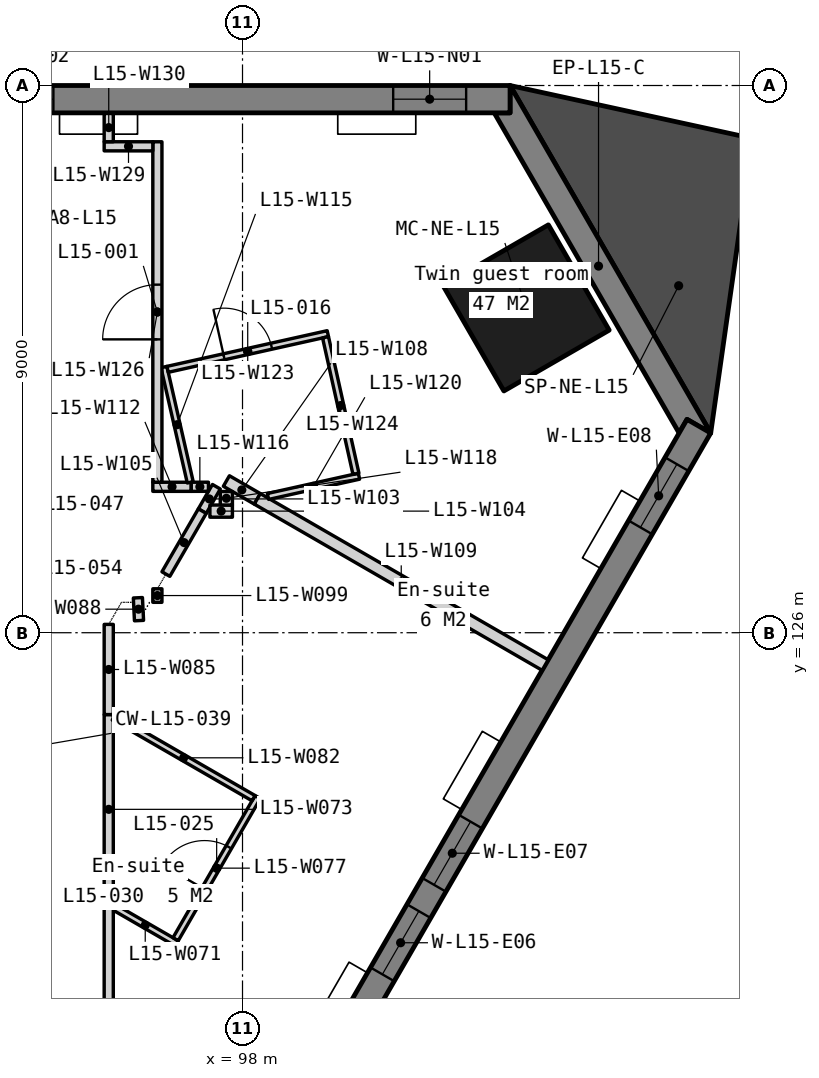
"""IFC4 building model, lengths in metres.
Left out: names, types, materials, properties, quantities, classifications, styles, units other than length and angle.
Written with IfcOpenShell. Run it as: python <this file> out.ifc"""

import sys

from ifc_helpers import new_model, si_unit, direction, frame, frame_2d, origin, origin_2d, place, context, subcontext, project, spatial, polyline, rectangle, outline, extrude, element, fill, save


model = new_model("IFC4")
c1 = context("Model", 3, precision=1e-05, world=origin(), true_north=direction((0.0, 1.0)))
c2 = subcontext(c1, "Body", "Model", "MODEL_VIEW")
j1 = project(units=[si_unit("LENGTHUNIT", "METRE"), si_unit("PLANEANGLEUNIT", "RADIAN")], contexts=[c1])
p1 = place(None, origin())
s1 = spatial("IfcSite", under=j1, at=p1, CompositionType="ELEMENT")
p2 = place(p1, origin())
s2 = spatial("IfcBuilding", under=s1, at=p2, CompositionType="ELEMENT")
p3 = place(p2, frame((0.0, 0.0, 66.5)))
s3 = spatial("IfcBuildingStorey", under=s2, at=p3, CompositionType="ELEMENT", Elevation=66.5)
p4 = place(p3, frame((102.664, 131.342, 0.0), z_axis=(0.0, 0.0, 1.0), x_axis=(-0.5, 0.866025403784, 0.0)))
e1 = element("IfcColumn", 1, at=p4, inside=s3, PredefinedType="COLUMN", context=c2, shape_type="SweptSolid", body=[
    extrude(rectangle(XDim=2.0, YDim=2.0, at=origin_2d()), origin(), (0.0, 0.0, 1.0), 3.5),
])
p5 = place(p3, frame((0.0, 0.0, -0.15)))
e2 = element("IfcWall", 2, at=p5, inside=s3, PredefinedType="SOLIDWALL", context=c2, shape_type="SweptSolid", body=[
    extrude(outline(polyline([(105.7, 129.284), (105.31, 129.509), (105.18, 129.284), (102.14, 134.55), (102.4, 134.55), (102.4, 135.0), (105.7, 129.284)])), origin(), (0.0, 0.0, 1.0), 3.5),
])
p6 = place(p3, frame((102.4, 134.775, -0.15), z_axis=(0.0, 0.0, 1.0), x_axis=(-1.0, 0.0, 0.0)))
e3 = element("IfcWall", 3, at=p6, inside=s3, PredefinedType="SOLIDWALL", context=c2, shape_type="SweptSolid", body=[
    extrude(outline(polyline([(44.8, 0.0), (44.8, 3.5), (0.0, 3.5), (0.0, 0.0), (44.8, 0.0)])), frame((0.0, 0.225, 0.0), z_axis=(0.0, -1.0, 0.0), x_axis=(1.0, 0.0, 0.0)), (0.0, 0.0, 1.0), 0.45),
])
p7 = place(p6, frame((0.722, 0.0, 1.05)))
e4 = element("IfcOpeningElement", 4, at=p7, cuts=e3, PredefinedType="OPENING", context=c2, shape_type="SweptSolid", body=[
    extrude(rectangle(XDim=1.2, YDim=1.5, at=frame_2d((0.6, 0.75))), frame((0.0, 0.235, 0.0), z_axis=(0.0, -1.0, 0.0), x_axis=(1.0, 0.0, 0.0)), (0.0, 0.0, 1.0), 0.47),
])
p8 = place(p6, frame((7.51, 0.0, 1.05)))
e5 = element("IfcOpeningElement", 5, at=p8, cuts=e3, PredefinedType="OPENING", context=c2, shape_type="SweptSolid", body=[
    extrude(rectangle(XDim=1.2, YDim=1.5, at=frame_2d((0.6, 0.75))), frame((0.0, 0.235, 0.0), z_axis=(0.0, -1.0, 0.0), x_axis=(1.0, 0.0, 0.0)), (0.0, 0.0, 1.0), 0.47),
])
p9 = place(p6, frame((9.21, 0.0, 1.05)))
e6 = element("IfcOpeningElement", 6, at=p9, cuts=e3, PredefinedType="OPENING", context=c2, shape_type="SweptSolid", body=[
    extrude(rectangle(XDim=1.2, YDim=1.5, at=frame_2d((0.6, 0.75))), frame((0.0, 0.235, 0.0), z_axis=(0.0, -1.0, 0.0), x_axis=(1.0, 0.0, 0.0)), (0.0, 0.0, 1.0), 0.47),
])
p10 = place(p6, frame((16.47, 0.0, 1.05)))
e7 = element("IfcOpeningElement", 7, at=p10, cuts=e3, PredefinedType="OPENING", context=c2, shape_type="SweptSolid", body=[
    extrude(rectangle(XDim=1.2, YDim=1.5, at=frame_2d((0.6, 0.75))), frame((0.0, 0.235, 0.0), z_axis=(0.0, -1.0, 0.0), x_axis=(1.0, 0.0, 0.0)), (0.0, 0.0, 1.0), 0.47),
])
p11 = place(p6, frame((18.17, 0.0, 1.05)))
e8 = element("IfcOpeningElement", 8, at=p11, cuts=e3, PredefinedType="OPENING", context=c2, shape_type="SweptSolid", body=[
    extrude(rectangle(XDim=1.2, YDim=1.5, at=frame_2d((0.6, 0.75))), frame((0.0, 0.235, 0.0), z_axis=(0.0, -1.0, 0.0), x_axis=(1.0, 0.0, 0.0)), (0.0, 0.0, 1.0), 0.47),
])
p12 = place(p6, frame((25.43, 0.0, 1.05)))
e9 = element("IfcOpeningElement", 9, at=p12, cuts=e3, PredefinedType="OPENING", context=c2, shape_type="SweptSolid", body=[
    extrude(rectangle(XDim=1.2, YDim=1.5, at=frame_2d((0.6, 0.75))), frame((0.0, 0.235, 0.0), z_axis=(0.0, -1.0, 0.0), x_axis=(1.0, 0.0, 0.0)), (0.0, 0.0, 1.0), 0.47),
])
p13 = place(p6, frame((27.13, 0.0, 1.05)))
e10 = element("IfcOpeningElement", 10, at=p13, cuts=e3, PredefinedType="OPENING", context=c2, shape_type="SweptSolid", body=[
    extrude(rectangle(XDim=1.2, YDim=1.5, at=frame_2d((0.6, 0.75))), frame((0.0, 0.235, 0.0), z_axis=(0.0, -1.0, 0.0), x_axis=(1.0, 0.0, 0.0)), (0.0, 0.0, 1.0), 0.47),
])
p14 = place(p6, frame((34.39, 0.0, 1.05)))
e11 = element("IfcOpeningElement", 11, at=p14, cuts=e3, PredefinedType="OPENING", context=c2, shape_type="SweptSolid", body=[
    extrude(rectangle(XDim=1.2, YDim=1.5, at=frame_2d((0.6, 0.75))), frame((0.0, 0.235, 0.0), z_axis=(0.0, -1.0, 0.0), x_axis=(1.0, 0.0, 0.0)), (0.0, 0.0, 1.0), 0.47),
])
p15 = place(p6, frame((36.09, 0.0, 1.05)))
e12 = element("IfcOpeningElement", 12, at=p15, cuts=e3, PredefinedType="OPENING", context=c2, shape_type="SweptSolid", body=[
    extrude(rectangle(XDim=1.2, YDim=1.5, at=frame_2d((0.6, 0.75))), frame((0.0, 0.235, 0.0), z_axis=(0.0, -1.0, 0.0), x_axis=(1.0, 0.0, 0.0)), (0.0, 0.0, 1.0), 0.47),
])
p16 = place(p6, frame((42.878, 0.0, 1.05)))
e13 = element("IfcOpeningElement", 13, at=p16, cuts=e3, PredefinedType="OPENING", context=c2, shape_type="SweptSolid", body=[
    extrude(rectangle(XDim=1.2, YDim=1.5, at=frame_2d((0.6, 0.75))), frame((0.0, 0.235, 0.0), z_axis=(0.0, -1.0, 0.0), x_axis=(1.0, 0.0, 0.0)), (0.0, 0.0, 1.0), 0.47),
])
p17 = place(p3, frame((88.435, 99.831, -0.15), z_axis=(0.0, 0.0, 1.0), x_axis=(0.500000806382, 0.866024938219, 0.0)))
e14 = element("IfcWall", 14, at=p17, inside=s3, PredefinedType="SOLIDWALL", context=c2, shape_type="SweptSolid", body=[
    extrude(outline(polyline([(34.14, 3.5), (34.14, 0.0), (0.0, 0.0), (0.0, 3.5), (34.14, 3.5)])), frame((0.0, 0.225, 0.0), z_axis=(0.0, -1.0, 0.0), x_axis=(1.0, 0.0, 0.0)), (0.0, 0.0, 1.0), 0.45),
])
p18 = place(p17, frame((5.81, 0.0, 1.05)))
e15 = element("IfcOpeningElement", 15, at=p18, cuts=e14, PredefinedType="OPENING", context=c2, shape_type="SweptSolid", body=[
    extrude(rectangle(XDim=1.2, YDim=1.5, at=frame_2d((0.6, 0.75))), frame((0.0, 0.235, 0.0), z_axis=(0.0, -1.0, 0.0), x_axis=(1.0, 0.0, 0.0)), (0.0, 0.0, 1.0), 0.47),
])
p19 = place(p17, frame((7.51, 0.0, 1.05)))
e16 = element("IfcOpeningElement", 16, at=p19, cuts=e14, PredefinedType="OPENING", context=c2, shape_type="SweptSolid", body=[
    extrude(rectangle(XDim=1.2, YDim=1.5, at=frame_2d((0.6, 0.75))), frame((0.0, 0.235, 0.0), z_axis=(0.0, -1.0, 0.0), x_axis=(1.0, 0.0, 0.0)), (0.0, 0.0, 1.0), 0.47),
])
p20 = place(p17, frame((14.77, 0.0, 1.05)))
e17 = element("IfcOpeningElement", 17, at=p20, cuts=e14, PredefinedType="OPENING", context=c2, shape_type="SweptSolid", body=[
    extrude(rectangle(XDim=1.2, YDim=1.5, at=frame_2d((0.6, 0.75))), frame((0.0, 0.235, 0.0), z_axis=(0.0, -1.0, 0.0), x_axis=(1.0, 0.0, 0.0)), (0.0, 0.0, 1.0), 0.47),
])
p21 = place(p17, frame((16.47, 0.0, 1.05)))
e18 = element("IfcOpeningElement", 18, at=p21, cuts=e14, PredefinedType="OPENING", context=c2, shape_type="SweptSolid", body=[
    extrude(rectangle(XDim=1.2, YDim=1.5, at=frame_2d((0.6, 0.75))), frame((0.0, 0.235, 0.0), z_axis=(0.0, -1.0, 0.0), x_axis=(1.0, 0.0, 0.0)), (0.0, 0.0, 1.0), 0.47),
])
p22 = place(p17, frame((23.73, 0.0, 1.05)))
e19 = element("IfcOpeningElement", 19, at=p22, cuts=e14, PredefinedType="OPENING", context=c2, shape_type="SweptSolid", body=[
    extrude(rectangle(XDim=1.2, YDim=1.5, at=frame_2d((0.6, 0.75))), frame((0.0, 0.235, 0.0), z_axis=(0.0, -1.0, 0.0), x_axis=(1.0, 0.0, 0.0)), (0.0, 0.0, 1.0), 0.47),
])
p23 = place(p17, frame((25.43, 0.0, 1.05)))
e20 = element("IfcOpeningElement", 20, at=p23, cuts=e14, PredefinedType="OPENING", context=c2, shape_type="SweptSolid", body=[
    extrude(rectangle(XDim=1.2, YDim=1.5, at=frame_2d((0.6, 0.75))), frame((0.0, 0.235, 0.0), z_axis=(0.0, -1.0, 0.0), x_axis=(1.0, 0.0, 0.0)), (0.0, 0.0, 1.0), 0.47),
])
p24 = place(p17, frame((32.218, 0.0, 1.05)))
e21 = element("IfcOpeningElement", 21, at=p24, cuts=e14, PredefinedType="OPENING", context=c2, shape_type="SweptSolid", body=[
    extrude(rectangle(XDim=1.2, YDim=1.5, at=frame_2d((0.6, 0.75))), frame((0.0, 0.235, 0.0), z_axis=(0.0, -1.0, 0.0), x_axis=(1.0, 0.0, 0.0)), (0.0, 0.0, 1.0), 0.47),
])
p25 = place(p3, frame((0.0, 0.0, -0.15)))
e22 = element("IfcWall", 22, at=p25, inside=s3, PredefinedType="SOLIDWALL", context=c2, shape_type="SweptSolid", body=[
    extrude(outline(polyline([(105.7, 129.284), (106.389, 134.13), (102.4, 135.0), (105.7, 129.284)])), origin(), (0.0, 0.0, 1.0), 3.5),
])
p26 = place(p3, frame((95.882, 121.489, 0.0), z_axis=(0.0, 0.0, 1.0), x_axis=(0.865998640954, -0.500046351717, 0.0)))
e23 = element("IfcWall", 23, at=p26, inside=s3, PredefinedType="PARTITIONING", context=c2, shape_type="SweptSolid", body=[
    extrude(rectangle(XDim=1.196, YDim=0.1, at=frame_2d((0.598, 0.0))), origin(), (0.0, 0.0, 1.0), 3.35),
])
p27 = place(p3, frame((95.8, 121.536, 0.0), z_axis=(0.0, 0.0, 1.0), x_axis=(0.0, 1.0, 0.0)))
e24 = element("IfcWall", 24, at=p27, inside=s3, PredefinedType="PARTITIONING", context=c2, shape_type="SweptSolid", body=[
    extrude(rectangle(XDim=3.118, YDim=0.15, at=frame_2d((1.559, 0.0))), origin(), (0.0, 0.0, 1.0), 3.35),
])
p28 = place(p3, frame((95.8, 117.825, 0.0), z_axis=(0.0, 0.0, 1.0), x_axis=(0.0, 1.0, 0.0)))
e25 = element("IfcWall", 25, at=p28, inside=s3, PredefinedType="PARTITIONING", context=c2, shape_type="SweptSolid", body=[
    extrude(rectangle(XDim=3.711, YDim=0.15, at=frame_2d((1.855, 0.0))), origin(), (0.0, 0.0, 1.0), 3.35),
])
p29 = place(p3, frame((96.9, 120.959, 0.0), z_axis=(0.0, 0.0, 1.0), x_axis=(0.499980770555, 0.866036505625, 0.0)))
e26 = element("IfcWall", 26, at=p29, inside=s3, PredefinedType="PARTITIONING", context=c2, shape_type="SweptSolid", body=[
    extrude(rectangle(XDim=2.7, YDim=0.1, at=frame_2d((1.35, 0.0))), origin(), (0.0, 0.0, 1.0), 3.35),
])
p30 = place(p29, frame((0.95, 0.0, 0.0)))
e27 = element("IfcOpeningElement", 27, at=p30, cuts=e26, PredefinedType="OPENING", context=c2, shape_type="SweptSolid", body=[
    extrude(rectangle(XDim=0.8, YDim=2.1, at=frame_2d((0.4, 1.05))), frame((0.0, 0.06, 0.0), z_axis=(0.0, -1.0, 0.0), x_axis=(1.0, 0.0, 0.0)), (0.0, 0.0, 1.0), 0.12),
])
p31 = place(p3, frame((95.882, 124.606, 0.0), z_axis=(0.0, 0.0, 1.0), x_axis=(0.866004891035, -0.500035527442, 0.0)))
e28 = element("IfcWall", 28, at=p31, inside=s3, PredefinedType="PARTITIONING", context=c2, shape_type="SweptSolid", body=[
    extrude(rectangle(XDim=2.655, YDim=0.1, at=frame_2d((1.328, 0.0))), origin(), (0.0, 0.0, 1.0), 3.35),
])
p32 = place(p3, frame((95.8, 124.654, 0.0), z_axis=(0.0, 0.0, 1.0), x_axis=(0.0, 1.0, 0.0)))
e29 = element("IfcWall", 29, at=p32, inside=s3, PredefinedType="PARTITIONING", context=c2, shape_type="SweptSolid", body=[
    extrude(rectangle(XDim=1.483, YDim=0.15, at=frame_2d((0.742, 0.0))), origin(), (0.0, 0.0, 1.0), 3.35),
])
p33 = place(p3, frame((96.28, 126.575, 0.0), z_axis=(0.0, 0.0, 1.0), x_axis=(0.049354603538, -0.998781318963, 0.0)))
e30 = element("IfcWall", 30, at=p33, inside=s3, PredefinedType="PARTITIONING", context=c2, shape_type="SweptSolid", body=[
    extrude(rectangle(XDim=0.376, YDim=0.15, at=frame_2d((0.188, 0.0))), origin(), (0.0, 0.0, 1.0), 3.35),
])
p34 = place(p3, frame((96.6, 126.5, 0.0), z_axis=(0.0, 0.0, 1.0), x_axis=(0.0, 1.0, 0.0)))
e31 = element("IfcWall", 31, at=p34, inside=s3, PredefinedType="PARTITIONING", context=c2, shape_type="SweptSolid", body=[
    extrude(rectangle(XDim=0.223, YDim=0.15, at=frame_2d((0.111, 0.0))), origin(), (0.0, 0.0, 1.0), 3.35),
])
p35 = place(p3, frame((97.339, 128.0, 0.0), z_axis=(0.0, 0.0, 1.0), x_axis=(0.500391795928, 0.865799082101, 0.0)))
e32 = element("IfcWall", 32, at=p35, inside=s3, PredefinedType="PARTITIONING", context=c2, shape_type="SweptSolid", body=[
    extrude(rectangle(XDim=0.463, YDim=0.15, at=frame_2d((0.231, 0.0))), origin(), (0.0, 0.0, 1.0), 3.35),
])
p36 = place(p3, frame((97.464, 128.0, 0.0), z_axis=(0.0, 0.0, 1.0), x_axis=(1.0, 0.0, 0.0)))
e33 = element("IfcWall", 33, at=p36, inside=s3, PredefinedType="PARTITIONING", context=c2, shape_type="SweptSolid", body=[
    extrude(rectangle(XDim=0.37, YDim=0.2, at=frame_2d((0.185, 0.0))), origin(), (0.0, 0.0, 1.0), 2.938),
])
p37 = place(p3, frame((96.74, 126.965, 0.0), z_axis=(0.0, 0.0, 1.0), x_axis=(0.500529245116, 0.865719628277, 0.0)))
e34 = element("IfcWall", 34, at=p37, inside=s3, PredefinedType="PARTITIONING", context=c2, shape_type="SweptSolid", body=[
    extrude(rectangle(XDim=1.196, YDim=0.15, at=frame_2d((0.598, 0.0))), origin(), (0.0, 0.0, 1.0), 3.35),
])
p38 = place(p3, frame((97.735, 128.495, 0.0), z_axis=(0.0, 0.0, 1.0), x_axis=(0.866137124377, -0.499806444312, 0.0)))
e35 = element("IfcWall", 35, at=p38, inside=s3, PredefinedType="PARTITIONING", context=c2, shape_type="SweptSolid", body=[
    extrude(rectangle(XDim=0.587, YDim=0.2, at=frame_2d((0.293, 0.0))), origin(), (0.0, 0.0, 1.0), 3.35),
])
p39 = place(p3, frame((98.243, 128.202, 0.0), z_axis=(0.0, 0.0, 1.0), x_axis=(0.866021955858, -0.500005971936, 0.0)))
e36 = element("IfcWall", 36, at=p39, inside=s3, PredefinedType="PARTITIONING", context=c2, shape_type="SweptSolid", body=[
    extrude(rectangle(XDim=5.466, YDim=0.2, at=frame_2d((2.733, 0.0))), origin(), (0.0, 0.0, 1.0), 3.35),
])
p40 = place(p3, frame((96.525, 128.4, 0.0), z_axis=(0.0, 0.0, 1.0), x_axis=(1.0, 0.0, 0.0)))
e37 = element("IfcWall", 37, at=p40, inside=s3, PredefinedType="PARTITIONING", context=c2, shape_type="SweptSolid", body=[
    extrude(rectangle(XDim=0.633, YDim=0.15, at=frame_2d((0.316, 0.0))), origin(), (0.0, 0.0, 1.0), 3.35),
])
p41 = place(p3, frame((96.708, 130.37, 0.0), z_axis=(0.0, 0.0, 1.0), x_axis=(0.222402197424, -0.974955005413, 0.0)))
e38 = element("IfcWall", 38, at=p41, inside=s3, PredefinedType="PARTITIONING", context=c2, shape_type="SweptSolid", body=[
    extrude(rectangle(XDim=1.945, YDim=0.1, at=frame_2d((0.973, 0.0))), origin(), (0.0, 0.0, 1.0), 3.35),
])
p42 = place(p3, frame((97.157, 128.4, 0.0), z_axis=(0.0, 0.0, 1.0), x_axis=(0.999996638419, 0.002592903989, 0.0)))
e39 = element("IfcWall", 39, at=p42, inside=s3, PredefinedType="PARTITIONING", context=c2, shape_type="SweptSolid", body=[
    extrude(rectangle(XDim=0.282, YDim=0.15, at=frame_2d((0.141, 0.0))), origin(), (0.0, 0.0, 1.0), 3.35),
])
p43 = place(p3, frame((97.734, 128.1, 0.0), z_axis=(0.0, 0.0, 1.0), x_axis=(0.001098900435, 0.999999396209, 0.0)))
e40 = element("IfcWall", 40, at=p43, inside=s3, PredefinedType="PARTITIONING", context=c2, shape_type="SweptSolid", body=[
    extrude(rectangle(XDim=0.222, YDim=0.2, at=frame_2d((0.111, 0.0))), origin(), (0.0, 0.0, 1.0), 3.35),
])
p44 = place(p3, frame((98.419, 128.241, 0.0), z_axis=(0.0, 0.0, 1.0), x_axis=(0.976051976124, 0.217537444834, 0.0)))
e41 = element("IfcWall", 41, at=p44, inside=s3, PredefinedType="PARTITIONING", context=c2, shape_type="SweptSolid", body=[
    extrude(rectangle(XDim=1.533, YDim=0.1, at=frame_2d((0.767, 0.0))), origin(), (0.0, 0.0, 1.0), 3.35),
])
p45 = place(p3, frame((96.768, 130.332, 0.0), z_axis=(0.0, 0.0, 1.0), x_axis=(0.976069905732, 0.21745698224, 0.0)))
e42 = element("IfcWall", 42, at=p45, inside=s3, PredefinedType="PARTITIONING", context=c2, shape_type="SweptSolid", body=[
    extrude(rectangle(XDim=2.7, YDim=0.1, at=frame_2d((1.35, 0.0))), origin(), (0.0, 0.0, 1.0), 3.35),
])
p46 = place(p45, frame((0.95, 0.0, 0.0)))
e43 = element("IfcOpeningElement", 43, at=p46, cuts=e42, PredefinedType="OPENING", context=c2, shape_type="SweptSolid", body=[
    extrude(rectangle(XDim=0.8, YDim=2.1, at=frame_2d((0.4, 1.05))), frame((0.0, 0.06, 0.0), z_axis=(0.0, -1.0, 0.0), x_axis=(1.0, 0.0, 0.0)), (0.0, 0.0, 1.0), 0.12),
])
p47 = place(p3, frame((99.365, 130.859, 0.0), z_axis=(0.0, 0.0, 1.0), x_axis=(0.217402503607, -0.97608204134, 0.0)))
e44 = element("IfcWall", 44, at=p47, inside=s3, PredefinedType="PARTITIONING", context=c2, shape_type="SweptSolid", body=[
    extrude(rectangle(XDim=2.3, YDim=0.1, at=frame_2d((1.15, 0.0))), origin(), (0.0, 0.0, 1.0), 3.35),
])
p48 = place(p3, frame((96.6, 128.475, 0.0), z_axis=(0.0, 0.0, 1.0), x_axis=(0.0, 1.0, 0.0)))
e45 = element("IfcWall", 45, at=p48, inside=s3, PredefinedType="PARTITIONING", context=c2, shape_type="SweptSolid", body=[
    extrude(rectangle(XDim=5.599, YDim=0.15, at=frame_2d((2.8, 0.0))), origin(), (0.0, 0.0, 1.0), 3.35),
])
p49 = place(p48, frame((2.35, 0.0, 0.0)))
e46 = element("IfcOpeningElement", 46, at=p49, cuts=e45, PredefinedType="OPENING", context=c2, shape_type="SweptSolid", body=[
    extrude(rectangle(XDim=0.9, YDim=2.1, at=frame_2d((0.45, 1.05))), frame((0.0, 0.085, 0.0), z_axis=(0.0, -1.0, 0.0), x_axis=(1.0, 0.0, 0.0)), (0.0, 0.0, 1.0), 0.17),
])
p50 = place(p3, frame((95.725, 134.0, 0.0), z_axis=(0.0, 0.0, 1.0), x_axis=(0.999999813645, -0.000610500497, 0.0)))
e47 = element("IfcWall", 47, at=p50, inside=s3, PredefinedType="PARTITIONING", context=c2, shape_type="SweptSolid", body=[
    extrude(rectangle(XDim=0.8, YDim=0.15, at=frame_2d((0.4, 0.0))), origin(), (0.0, 0.0, 1.0), 2.887),
])
p51 = place(p3, frame((95.8, 134.075, 0.0), z_axis=(0.0, 0.0, 1.0), x_axis=(0.0, 1.0, 0.0)))
e48 = element("IfcWall", 48, at=p51, inside=s3, PredefinedType="PARTITIONING", context=c2, shape_type="SweptSolid", body=[
    extrude(rectangle(XDim=0.465, YDim=0.15, at=frame_2d((0.232, 0.0))), origin(), (0.0, 0.0, 1.0), 3.35),
])
p52 = place(p7, origin())
e49 = element("IfcWindow", 49, at=p52, inside=s3, PartitioningType="SINGLE_PANEL", PredefinedType="WINDOW", context=c2, shape_type="SweptSolid", body=[
    extrude(rectangle(XDim=1.2, YDim=1.5, at=frame_2d((0.6, 0.75))), frame((0.0, 0.03, 0.0), z_axis=(0.0, -1.0, 0.0), x_axis=(1.0, 0.0, 0.0)), (0.0, 0.0, 1.0), 0.06),
])
fill(e4, e49)
p53 = place(p8, origin())
e50 = element("IfcWindow", 50, at=p53, inside=s3, PartitioningType="SINGLE_PANEL", PredefinedType="WINDOW", context=c2, shape_type="SweptSolid", body=[
    extrude(rectangle(XDim=1.2, YDim=1.5, at=frame_2d((0.6, 0.75))), frame((0.0, 0.03, 0.0), z_axis=(0.0, -1.0, 0.0), x_axis=(1.0, 0.0, 0.0)), (0.0, 0.0, 1.0), 0.06),
])
fill(e5, e50)
p54 = place(p22, origin())
e51 = element("IfcWindow", 51, at=p54, inside=s3, PartitioningType="SINGLE_PANEL", PredefinedType="WINDOW", context=c2, shape_type="SweptSolid", body=[
    extrude(rectangle(XDim=1.2, YDim=1.5, at=frame_2d((0.6, 0.75))), frame((0.0, 0.03, 0.0), z_axis=(0.0, -1.0, 0.0), x_axis=(1.0, 0.0, 0.0)), (0.0, 0.0, 1.0), 0.06),
])
fill(e19, e51)
p55 = place(p23, origin())
e52 = element("IfcWindow", 52, at=p55, inside=s3, PartitioningType="SINGLE_PANEL", PredefinedType="WINDOW", context=c2, shape_type="SweptSolid", body=[
    extrude(rectangle(XDim=1.2, YDim=1.5, at=frame_2d((0.6, 0.75))), frame((0.0, 0.03, 0.0), z_axis=(0.0, -1.0, 0.0), x_axis=(1.0, 0.0, 0.0)), (0.0, 0.0, 1.0), 0.06),
])
fill(e20, e52)
p56 = place(p24, origin())
e53 = element("IfcWindow", 53, at=p56, inside=s3, PartitioningType="SINGLE_PANEL", PredefinedType="WINDOW", context=c2, shape_type="SweptSolid", body=[
    extrude(rectangle(XDim=1.2, YDim=1.5, at=frame_2d((0.6, 0.75))), frame((0.0, 0.03, 0.0), z_axis=(0.0, -1.0, 0.0), x_axis=(1.0, 0.0, 0.0)), (0.0, 0.0, 1.0), 0.06),
])
fill(e21, e53)
p57 = place(p49, origin())
e54 = element("IfcDoor", 54, at=p57, inside=s3, OperationType="SINGLE_SWING_LEFT", PredefinedType="DOOR", context=c2, shape_type="SweptSolid", body=[
    extrude(rectangle(XDim=0.9, YDim=2.1, at=frame_2d((0.45, 1.05))), frame((0.0, 0.025, 0.0), z_axis=(0.0, -1.0, 0.0), x_axis=(1.0, 0.0, 0.0)), (0.0, 0.0, 1.0), 0.05),
])
fill(e46, e54)
p58 = place(p46, origin())
e55 = element("IfcDoor", 55, at=p58, inside=s3, OperationType="SINGLE_SWING_LEFT", PredefinedType="DOOR", context=c2, shape_type="SweptSolid", body=[
    extrude(rectangle(XDim=0.8, YDim=2.1, at=frame_2d((0.4, 1.05))), frame((0.0, 0.025, 0.0), z_axis=(0.0, -1.0, 0.0), x_axis=(1.0, 0.0, 0.0)), (0.0, 0.0, 1.0), 0.05),
])
fill(e43, e55)
p59 = place(p30, origin())
e56 = element("IfcDoor", 56, at=p59, inside=s3, OperationType="SINGLE_SWING_LEFT", PredefinedType="DOOR", context=c2, shape_type="SweptSolid", body=[
    extrude(rectangle(XDim=0.8, YDim=2.1, at=frame_2d((0.4, 1.05))), frame((0.0, 0.025, 0.0), z_axis=(0.0, -1.0, 0.0), x_axis=(1.0, 0.0, 0.0)), (0.0, 0.0, 1.0), 0.05),
])
fill(e27, e56)
save(model, sys.argv[1])
